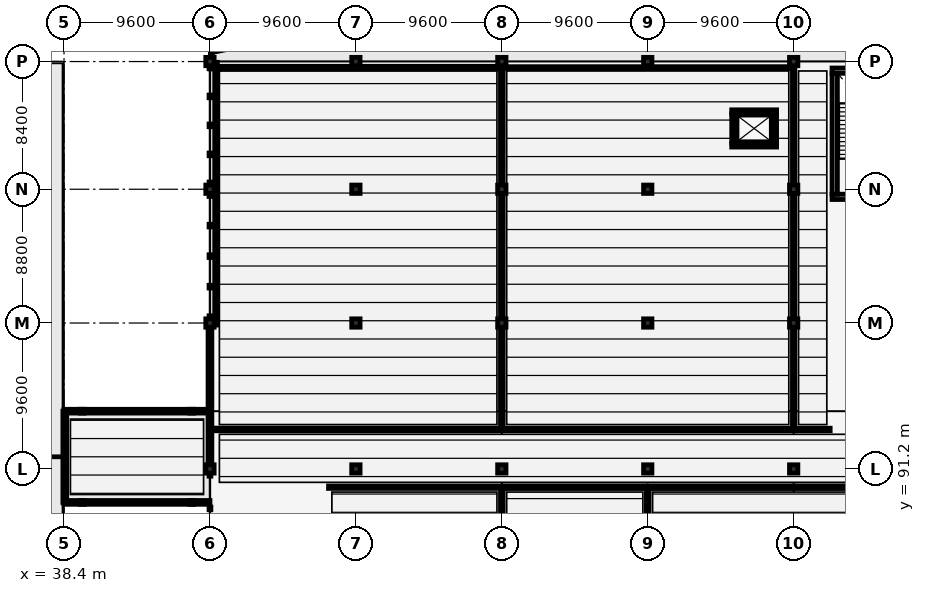
"""IFC4 building model, lengths in metres.
Left out: names, types, materials, properties, quantities, classifications, styles, units other than length and angle.
Written with IfcOpenShell. Run it as: python <this file> out.ifc"""

import sys

from ifc_helpers import new_model, si_unit, direction, frame, frame_2d, origin, origin_2d, place, context, subcontext, project, spatial, rectangle, hollow_rectangle, extrude, element, fill, save


model = new_model("IFC4")
c1 = context("Model", 3, precision=1e-05, world=origin(), true_north=direction((0.0, 1.0)))
c2 = subcontext(c1, "Body", "Model", "MODEL_VIEW")
j1 = project(units=[si_unit("LENGTHUNIT", "METRE"), si_unit("PLANEANGLEUNIT", "RADIAN")], contexts=[c1])
p1 = place(None, origin())
s1 = spatial("IfcSite", under=j1, at=p1, CompositionType="ELEMENT")
p2 = place(p1, origin())
s2 = spatial("IfcBuilding", under=s1, at=p2, CompositionType="ELEMENT")
p3 = place(p2, frame((0.0, 0.0, 4.8)))
s3 = spatial("IfcBuildingStorey", under=s2, at=p3, CompositionType="ELEMENT", Elevation=4.8)
for number, where, z_axis, x_axis in (
    (1, (48.0, 91.2, 0.0), (0.0, 0.0, 1.0), (1.0, 0.0, 0.0)),
    (2, (48.0, 100.8, 0.0), (0.0, 0.0, 1.0), (1.0, 0.0, 0.0)),
    (3, (48.0, 109.6, 0.0), (0.0, 0.0, 1.0), (1.0, 0.0, 0.0)),
    (4, (48.0, 118.0, 0.0), (0.0, 0.0, 1.0), (1.0, 0.0, 0.0)),
    (5, (57.6, 91.2, 0.0), (0.0, 0.0, 1.0), (1.0, 0.0, 0.0)),
    (6, (57.6, 100.8, 0.0), (0.0, 0.0, 1.0), (1.0, 0.0, 0.0)),
    (7, (57.6, 109.6, 0.0), (0.0, 0.0, 1.0), (1.0, 0.0, 0.0)),
    (8, (57.6, 118.0, 0.0), (0.0, 0.0, 1.0), (1.0, 0.0, 0.0)),
    (9, (67.2, 91.2, 0.0), (0.0, 0.0, 1.0), (1.0, 0.0, 0.0)),
    (10, (67.2, 100.8, 0.0), (0.0, 0.0, 1.0), (1.0, 0.0, 0.0)),
    (11, (67.2, 109.6, 0.0), (0.0, 0.0, 1.0), (1.0, 0.0, 0.0)),
    (12, (67.2, 118.0, 0.0), (0.0, 0.0, 1.0), (1.0, 0.0, 0.0)),
    (13, (76.8, 91.2, 0.0), (0.0, 0.0, 1.0), (1.0, 0.0, 0.0)),
    (14, (76.8, 100.8, 0.0), (0.0, 0.0, 1.0), (1.0, 0.0, 0.0)),
    (15, (76.8, 109.6, 0.0), (0.0, 0.0, 1.0), (1.0, 0.0, 0.0)),
    (16, (76.8, 118.0, 0.0), (0.0, 0.0, 1.0), (1.0, 0.0, 0.0)),
    (17, (86.4, 91.2, 0.0), (0.0, 0.0, 1.0), (1.0, 0.0, 0.0)),
    (18, (86.4, 100.8, 0.0), (0.0, 0.0, 1.0), (1.0, 0.0, 0.0)),
    (19, (86.4, 109.6, 0.0), (0.0, 0.0, 1.0), (1.0, 0.0, 0.0)),
    (20, (86.4, 118.0, 0.0), (0.0, 0.0, 1.0), (1.0, 0.0, 0.0)),
):
    element("IfcColumn", number, at=place(p3, frame(where, z_axis=z_axis, x_axis=x_axis)), inside=s3, PredefinedType="COLUMN", context=c2, shape_type="SweptSolid", body=[
        extrude(rectangle(XDim=0.55, YDim=0.55, at=origin_2d()), origin(), (0.0, 0.0, 1.0), 4.8),
    ])
for number, where, z_axis, x_axis in (
    (21, (39.6, 89.0, 0.0), (0.0, 0.0, 1.0), (1.0, 0.0, 0.0)),
    (22, (39.6, 95.0, 0.0), (0.0, 0.0, 1.0), (1.0, 0.0, 0.0)),
    (23, (46.8, 89.0, 0.0), (0.0, 0.0, 1.0), (1.0, 0.0, 0.0)),
    (24, (46.8, 95.0, 0.0), (0.0, 0.0, 1.0), (1.0, 0.0, 0.0)),
):
    element("IfcColumn", number, at=place(p3, frame(where, z_axis=z_axis, x_axis=x_axis)), inside=s3, PredefinedType="COLUMN", context=c2, shape_type="SweptSolid", body=[
        extrude(hollow_rectangle(XDim=0.254, YDim=0.254, WallThickness=0.012, at=origin_2d()), origin(), (0.0, 0.0, 1.0), 2.58),
    ])
p4 = place(p3, frame((48.0, 91.475, 0.0), z_axis=(0.0, 0.0, 1.0), x_axis=(0.0, 1.0, 0.0)))
e25 = element("IfcWall", 25, at=p4, inside=s3, PredefinedType="STANDARD", context=c2, shape_type="SweptSolid", body=[
    extrude(rectangle(XDim=9.05, YDim=0.25, at=frame_2d((4.525, 0.0))), origin(), (0.0, 0.0, 1.0), 4.046),
])
p5 = place(p4, frame((6.2, 0.0, 1.05)))
e26 = element("IfcOpeningElement", 26, at=p5, cuts=e25, PredefinedType="OPENING", context=c2, shape_type="SweptSolid", body=[
    extrude(rectangle(XDim=1.12, YDim=1.44, at=frame_2d((0.56, 0.72))), frame((0.0, 0.135, 0.0), z_axis=(0.0, -1.0, 0.0), x_axis=(1.0, 0.0, 0.0)), (0.0, 0.0, 1.0), 0.27),
])
p6 = place(p4, frame((0.35, 0.0, 0.0)))
e27 = element("IfcOpeningElement", 27, at=p6, cuts=e25, PredefinedType="OPENING", context=c2, shape_type="SweptSolid", body=[
    extrude(rectangle(XDim=1.25, YDim=2.15, at=frame_2d((0.625, 1.075))), frame((0.0, 0.135, 0.0), z_axis=(0.0, -1.0, 0.0), x_axis=(1.0, 0.0, 0.0)), (0.0, 0.0, 1.0), 0.27),
])
p7 = place(p3, frame((38.45, 89.0, 0.0), z_axis=(0.0, 0.0, 1.0), x_axis=(0.0, 1.0, 0.0)))
e28 = element("IfcWall", 28, at=p7, inside=s3, PredefinedType="STANDARD", context=c2, shape_type="SweptSolid", body=[
    extrude(rectangle(XDim=6.0, YDim=0.25, at=frame_2d((3.0, 0.0))), origin(), (0.0, 0.0, 1.0), 2.32),
])
p8 = place(p7, frame((0.7, 0.0, 0.0)))
e29 = element("IfcOpeningElement", 29, at=p8, cuts=e28, PredefinedType="OPENING", context=c2, shape_type="SweptSolid", body=[
    extrude(rectangle(XDim=1.48, YDim=2.11, at=frame_2d((0.74, 1.055))), frame((0.0, 0.135, 0.0), z_axis=(0.0, -1.0, 0.0), x_axis=(1.0, 0.0, 0.0)), (0.0, 0.0, 1.0), 0.27),
])
p9 = place(p7, frame((3.7, 0.0, 0.0)))
e30 = element("IfcOpeningElement", 30, at=p9, cuts=e28, PredefinedType="OPENING", context=c2, shape_type="SweptSolid", body=[
    extrude(rectangle(XDim=1.6, YDim=2.2, at=frame_2d((0.8, 1.1))), frame((0.0, 0.135, 0.0), z_axis=(0.0, -1.0, 0.0), x_axis=(1.0, 0.0, 0.0)), (0.0, 0.0, 1.0), 0.27),
])
for number, where, z_axis, x_axis in (
    (31, (38.4, 89.0, 0.0), (0.0, 0.0, 1.0), (1.0, 0.0, 0.0)),
    (32, (38.4, 95.0, 0.0), (0.0, 0.0, 1.0), (1.0, 0.0, 0.0)),
):
    element("IfcWall", number, at=place(p3, frame(where, z_axis=z_axis, x_axis=x_axis)), inside=s3, PredefinedType="STANDARD", context=c2, shape_type="SweptSolid", body=[
        extrude(rectangle(XDim=9.6, YDim=0.25, at=frame_2d((4.8, 0.0))), origin(), (0.0, 0.0, 1.0), 2.106),
    ])
for number, where, z_axis, x_axis in (
    (33, (94.575, 109.1, 0.0), (0.0, 0.0, 1.0), (-1.0, 0.0, 0.0)),
    (34, (88.925, 117.4, 0.0), (0.0, 0.0, 1.0), (1.0, 0.0, 0.0)),
):
    element("IfcWall", number, at=place(p3, frame(where, z_axis=z_axis, x_axis=x_axis)), inside=s3, PredefinedType="SHEAR", context=c2, shape_type="SweptSolid", body=[
        extrude(rectangle(XDim=5.65, YDim=0.35, at=frame_2d((2.825, 0.0))), origin(), (0.0, 0.0, 1.0), 4.55),
    ])
p10 = place(p3, frame((89.1, 109.275, 0.0), z_axis=(0.0, 0.0, 1.0), x_axis=(0.0, 1.0, 0.0)))
e35 = element("IfcWall", 35, at=p10, inside=s3, PredefinedType="SHEAR", context=c2, shape_type="SweptSolid", body=[
    extrude(rectangle(XDim=7.95, YDim=0.35, at=frame_2d((3.975, 0.0))), origin(), (0.0, 0.0, 1.0), 4.55),
])
p11 = place(p10, frame((0.22, 0.0, 0.0)))
e36 = element("IfcOpeningElement", 36, at=p11, cuts=e35, PredefinedType="OPENING", context=c2, shape_type="SweptSolid", body=[
    extrude(rectangle(XDim=2.05, YDim=2.15, at=frame_2d((1.025, 1.075))), frame((0.0, 0.185, 0.0), z_axis=(0.0, -1.0, 0.0), x_axis=(1.0, 0.0, 0.0)), (0.0, 0.0, 1.0), 0.37),
])
p12 = place(p3, frame((85.275, 112.5, 0.0), z_axis=(0.0, 0.0, 1.0), x_axis=(-1.0, 0.0, 0.0)))
e37 = element("IfcWall", 37, at=p12, inside=s3, PredefinedType="SOLIDWALL", context=c2, shape_type="SweptSolid", body=[
    extrude(rectangle(XDim=2.95, YDim=0.25, at=frame_2d((1.475, 0.0))), origin(), (0.0, 0.0, 1.0), 4.55),
])
p13 = place(p12, frame((0.925, 0.0, 0.0)))
e38 = element("IfcOpeningElement", 38, at=p13, cuts=e37, PredefinedType="OPENING", context=c2, shape_type="SweptSolid", body=[
    extrude(rectangle(XDim=1.1, YDim=2.15, at=frame_2d((0.55, 1.075))), frame((0.0, 0.135, 0.0), z_axis=(0.0, -1.0, 0.0), x_axis=(1.0, 0.0, 0.0)), (0.0, 0.0, 1.0), 0.27),
])
p14 = place(p3, frame((82.325, 114.7, 0.0), z_axis=(0.0, 0.0, 1.0), x_axis=(1.0, 0.0, 0.0)))
e39 = element("IfcWall", 39, at=p14, inside=s3, PredefinedType="SOLIDWALL", context=c2, shape_type="SweptSolid", body=[
    extrude(rectangle(XDim=2.95, YDim=0.25, at=frame_2d((1.475, 0.0))), origin(), (0.0, 0.0, 1.0), 4.55),
])
for number, where, z_axis, x_axis in (
    (40, (82.45, 112.625, 0.0), (0.0, 0.0, 1.0), (0.0, 1.0, 0.0)),
    (41, (85.15, 114.575, 0.0), (0.0, 0.0, 1.0), (0.0, -1.0, 0.0)),
):
    element("IfcWall", number, at=place(p3, frame(where, z_axis=z_axis, x_axis=x_axis)), inside=s3, PredefinedType="SOLIDWALL", context=c2, shape_type="SweptSolid", body=[
        extrude(rectangle(XDim=1.95, YDim=0.25, at=frame_2d((0.975, 0.0))), origin(), (0.0, 0.0, 1.0), 4.55),
    ])
p15 = place(p3, frame((67.2, 81.4, 0.0), z_axis=(0.0, 0.0, 1.0), x_axis=(0.0, 1.0, 0.0)))
e42 = element("IfcWall", 42, at=p15, inside=s3, PredefinedType="PARTITIONING", context=c2, shape_type="SweptSolid", body=[
    extrude(rectangle(XDim=8.5, YDim=0.175, at=frame_2d((4.25, 0.0))), origin(), (0.0, 0.0, 1.0), 4.037),
])
p16 = place(p15, frame((3.45, 0.0, 0.0)))
e43 = element("IfcOpeningElement", 43, at=p16, cuts=e42, PredefinedType="OPENING", context=c2, shape_type="SweptSolid", body=[
    extrude(rectangle(XDim=1.6, YDim=2.15, at=frame_2d((0.8, 1.075))), frame((0.0, 0.097, 0.0), z_axis=(0.0, -1.0, 0.0), x_axis=(1.0, 0.0, 0.0)), (0.0, 0.0, 1.0), 0.195),
])
p17 = place(p3, frame((55.8, 90.0, 0.0), z_axis=(0.0, 0.0, 1.0), x_axis=(1.0, 0.0, 0.0)))
e44 = element("IfcWall", 44, at=p17, inside=s3, PredefinedType="PARTITIONING", context=c2, shape_type="SweptSolid", body=[
    extrude(rectangle(XDim=11.3, YDim=0.16, at=frame_2d((5.65, 0.0))), origin(), (0.0, 0.0, 1.0), 4.42),
])
p18 = place(p17, frame((4.75, 0.0, 0.0)))
e45 = element("IfcOpeningElement", 45, at=p18, cuts=e44, PredefinedType="OPENING", context=c2, shape_type="SweptSolid", body=[
    extrude(rectangle(XDim=1.8, YDim=2.15, at=frame_2d((0.9, 1.075))), frame((0.0, 0.09, 0.0), z_axis=(0.0, -1.0, 0.0), x_axis=(1.0, 0.0, 0.0)), (0.0, 0.0, 1.0), 0.18),
])
p19 = place(p3, frame((76.8, 81.4, 0.0), z_axis=(0.0, 0.0, 1.0), x_axis=(0.0, 1.0, 0.0)))
e46 = element("IfcWall", 46, at=p19, inside=s3, PredefinedType="PARTITIONING", context=c2, shape_type="SweptSolid", body=[
    extrude(rectangle(XDim=8.5, YDim=0.175, at=frame_2d((4.25, 0.0))), origin(), (0.0, 0.0, 1.0), 4.037),
])
p20 = place(p3, frame((67.3, 90.0, 0.0), z_axis=(0.0, 0.0, 1.0), x_axis=(1.0, 0.0, 0.0)))
e47 = element("IfcWall", 47, at=p20, inside=s3, PredefinedType="PARTITIONING", context=c2, shape_type="SweptSolid", body=[
    extrude(rectangle(XDim=9.4, YDim=0.175, at=frame_2d((4.7, 0.0))), origin(), (0.0, 0.0, 1.0), 4.42),
])
p21 = place(p20, frame((3.9, 0.0, 0.0)))
e48 = element("IfcOpeningElement", 48, at=p21, cuts=e47, PredefinedType="OPENING", context=c2, shape_type="SweptSolid", body=[
    extrude(rectangle(XDim=1.6, YDim=2.15, at=frame_2d((0.8, 1.075))), frame((0.0, 0.097, 0.0), z_axis=(0.0, -1.0, 0.0), x_axis=(1.0, 0.0, 0.0)), (0.0, 0.0, 1.0), 0.195),
])
p22 = place(p3, frame((76.9, 90.0, 0.0), z_axis=(0.0, 0.0, 1.0), x_axis=(1.0, 0.0, 0.0)))
e49 = element("IfcWall", 49, at=p22, inside=s3, PredefinedType="PARTITIONING", context=c2, shape_type="SweptSolid", body=[
    extrude(rectangle(XDim=19.05, YDim=0.175, at=frame_2d((9.525, 0.0))), origin(), (0.0, 0.0, 1.0), 4.42),
])
p23 = place(p22, frame((6.216, 0.0, 0.0)))
e50 = element("IfcOpeningElement", 50, at=p23, cuts=e49, PredefinedType="OPENING", context=c2, shape_type="SweptSolid", body=[
    extrude(rectangle(XDim=1.6, YDim=2.15, at=frame_2d((0.8, 1.075))), frame((0.0, 0.097, 0.0), z_axis=(0.0, -1.0, 0.0), x_axis=(1.0, 0.0, 0.0)), (0.0, 0.0, 1.0), 0.195),
])
p24 = place(p3, frame((86.5, 93.8, 0.0), z_axis=(0.0, 0.0, 1.0), x_axis=(1.0, 0.0, 0.0)))
e51 = element("IfcWall", 51, at=p24, inside=s3, PredefinedType="PARTITIONING", context=c2, shape_type="SweptSolid", body=[
    extrude(rectangle(XDim=2.3, YDim=0.16, at=frame_2d((1.15, 0.0))), origin(), (0.0, 0.0, 1.0), 4.42),
])
p25 = place(p24, frame((0.25, 0.0, 0.0)))
e52 = element("IfcOpeningElement", 52, at=p25, cuts=e51, PredefinedType="OPENING", context=c2, shape_type="SweptSolid", body=[
    extrude(rectangle(XDim=1.8, YDim=2.15, at=frame_2d((0.9, 1.075))), frame((0.0, 0.09, 0.0), z_axis=(0.0, -1.0, 0.0), x_axis=(1.0, 0.0, 0.0)), (0.0, 0.0, 1.0), 0.18),
])
p26 = place(p3, frame((48.05, 93.8, 0.0), z_axis=(0.0, 0.0, 1.0), x_axis=(1.0, 0.0, 0.0)))
e53 = element("IfcWall", 53, at=p26, inside=s3, PredefinedType="PARTITIONING", context=c2, shape_type="SweptSolid", body=[
    extrude(rectangle(XDim=19.05, YDim=0.175, at=frame_2d((9.525, 0.0))), origin(), (0.0, 0.0, 1.0), 4.42),
])
p27 = place(p26, frame((8.725, 0.0, 0.0)))
e54 = element("IfcOpeningElement", 54, at=p27, cuts=e53, PredefinedType="OPENING", context=c2, shape_type="SweptSolid", body=[
    extrude(rectangle(XDim=1.6, YDim=2.15, at=frame_2d((0.8, 1.075))), frame((0.0, 0.097, 0.0), z_axis=(0.0, -1.0, 0.0), x_axis=(1.0, 0.0, 0.0)), (0.0, 0.0, 1.0), 0.195),
])
p28 = place(p3, frame((67.3, 93.8, 0.0), z_axis=(0.0, 0.0, 1.0), x_axis=(1.0, 0.0, 0.0)))
e55 = element("IfcWall", 55, at=p28, inside=s3, PredefinedType="PARTITIONING", context=c2, shape_type="SweptSolid", body=[
    extrude(rectangle(XDim=19.0, YDim=0.16, at=frame_2d((9.5, 0.0))), origin(), (0.0, 0.0, 1.0), 4.42),
])
p29 = place(p28, frame((8.925, 0.0, 0.0)))
e56 = element("IfcOpeningElement", 56, at=p29, cuts=e55, PredefinedType="OPENING", context=c2, shape_type="SweptSolid", body=[
    extrude(rectangle(XDim=1.15, YDim=2.2, at=frame_2d((0.575, 1.1))), frame((0.0, 0.09, 0.0), z_axis=(0.0, -1.0, 0.0), x_axis=(1.0, 0.0, 0.0)), (0.0, 0.0, 1.0), 0.18),
])
p30 = place(p3, frame((86.4, 93.9, 0.0), z_axis=(0.0, 0.0, 1.0), x_axis=(0.0, 1.0, 0.0)))
e57 = element("IfcWall", 57, at=p30, inside=s3, PredefinedType="PARTITIONING", context=c2, shape_type="SweptSolid", body=[
    extrude(rectangle(XDim=24.05, YDim=0.16, at=frame_2d((12.025, 0.0))), origin(), (0.0, 0.0, 1.0), 4.037),
])
p31 = place(p30, frame((11.45, 0.0, 0.0)))
e58 = element("IfcOpeningElement", 58, at=p31, cuts=e57, PredefinedType="OPENING", context=c2, shape_type="SweptSolid", body=[
    extrude(rectangle(XDim=1.15, YDim=2.2, at=frame_2d((0.575, 1.1))), frame((0.0, 0.09, 0.0), z_axis=(0.0, -1.0, 0.0), x_axis=(1.0, 0.0, 0.0)), (0.0, 0.0, 1.0), 0.18),
])
p32 = place(p3, frame((67.2, 93.9, 0.0), z_axis=(0.0, 0.0, 1.0), x_axis=(0.0, 1.0, 0.0)))
e59 = element("IfcWall", 59, at=p32, inside=s3, PredefinedType="PARTITIONING", context=c2, shape_type="SweptSolid", body=[
    extrude(rectangle(XDim=24.05, YDim=0.175, at=frame_2d((12.025, 0.0))), origin(), (0.0, 0.0, 1.0), 4.037),
])
p33 = place(p3, frame((48.05, 117.6, 0.0), z_axis=(0.0, 0.0, 1.0), x_axis=(1.0, 0.0, 0.0)))
e60 = element("IfcWall", 60, at=p33, inside=s3, PredefinedType="PARTITIONING", context=c2, shape_type="SweptSolid", body=[
    extrude(rectangle(XDim=18.91, YDim=0.175, at=frame_2d((9.455, 0.0))), origin(), (0.0, 0.0, 1.0), 4.42),
])
p34 = place(p3, frame((48.4, 100.665, 0.0), z_axis=(0.0, 0.0, 1.0), x_axis=(0.0, 1.0, 0.0)))
e61 = element("IfcWall", 61, at=p34, inside=s3, PredefinedType="PARTITIONING", context=c2, shape_type="SweptSolid", body=[
    extrude(rectangle(XDim=17.285, YDim=0.175, at=frame_2d((8.643, 0.0))), origin(), (0.0, 0.0, 1.0), 4.42),
])
p35 = place(p3, frame((67.44, 117.6, 0.0), z_axis=(0.0, 0.0, 1.0), x_axis=(1.0, 0.0, 0.0)))
e62 = element("IfcWall", 62, at=p35, inside=s3, PredefinedType="PARTITIONING", context=c2, shape_type="SweptSolid", body=[
    extrude(rectangle(XDim=18.72, YDim=0.125, at=frame_2d((9.36, 0.0))), origin(), (0.0, 0.0, 1.0), 4.42),
])
p36 = place(p5, origin())
e63 = element("IfcWindow", 63, at=p36, inside=s3, PartitioningType="SINGLE_PANEL", PredefinedType="WINDOW", context=c2, shape_type="SweptSolid", body=[
    extrude(rectangle(XDim=1.12, YDim=1.44, at=frame_2d((0.56, 0.72))), frame((0.0, 0.03, 0.0), z_axis=(0.0, -1.0, 0.0), x_axis=(1.0, 0.0, 0.0)), (0.0, 0.0, 1.0), 0.06),
])
fill(e26, e63)
p37 = place(p8, origin())
e64 = element("IfcDoor", 64, at=p37, inside=s3, OperationType="DOUBLE_DOOR_SINGLE_SWING", PredefinedType="DOOR", context=c2, shape_type="SweptSolid", body=[
    extrude(rectangle(XDim=1.48, YDim=2.11, at=frame_2d((0.74, 1.055))), frame((0.0, 0.025, 0.0), z_axis=(0.0, -1.0, 0.0), x_axis=(1.0, 0.0, 0.0)), (0.0, 0.0, 1.0), 0.05),
])
fill(e29, e64)
p38 = place(p9, origin())
e65 = element("IfcDoor", 65, at=p38, inside=s3, OperationType="DOUBLE_DOOR_SINGLE_SWING", PredefinedType="DOOR", context=c2, shape_type="SweptSolid", body=[
    extrude(rectangle(XDim=1.6, YDim=2.2, at=frame_2d((0.8, 1.1))), frame((0.0, 0.025, 0.0), z_axis=(0.0, -1.0, 0.0), x_axis=(1.0, 0.0, 0.0)), (0.0, 0.0, 1.0), 0.05),
])
fill(e30, e65)
p39 = place(p3, frame((0.0, 0.0, 2.58)))
p40 = place(p39, frame((43.2, 92.0, 0.17)))
e66 = element("IfcDoor", 66, at=p40, inside=s3, OperationType="SINGLE_SWING_LEFT", PredefinedType="TRAPDOOR", context=c2, shape_type="SweptSolid", body=[
    extrude(rectangle(XDim=1.0, YDim=1.2, at=origin_2d()), origin(), (0.0, 0.0, 1.0), 0.05),
])
p41 = place(p11, origin())
e67 = element("IfcDoor", 67, at=p41, inside=s3, OperationType="DOUBLE_DOOR_SINGLE_SWING", PredefinedType="DOOR", context=c2, shape_type="SweptSolid", body=[
    extrude(rectangle(XDim=2.05, YDim=2.15, at=frame_2d((1.025, 1.075))), frame((0.0, 0.025, 0.0), z_axis=(0.0, -1.0, 0.0), x_axis=(1.0, 0.0, 0.0)), (0.0, 0.0, 1.0), 0.05),
])
fill(e36, e67)
p42 = place(p13, origin())
e68 = element("IfcDoor", 68, at=p42, inside=s3, OperationType="DOUBLE_DOOR_SLIDING", PredefinedType="DOOR", context=c2, shape_type="SweptSolid", body=[
    extrude(rectangle(XDim=1.1, YDim=2.15, at=frame_2d((0.55, 1.075))), frame((0.0, 0.025, 0.0), z_axis=(0.0, -1.0, 0.0), x_axis=(1.0, 0.0, 0.0)), (0.0, 0.0, 1.0), 0.05),
])
fill(e38, e68)
p43 = place(p18, origin())
e69 = element("IfcDoor", 69, at=p43, inside=s3, OperationType="DOUBLE_DOOR_SINGLE_SWING", PredefinedType="DOOR", context=c2, shape_type="SweptSolid", body=[
    extrude(rectangle(XDim=1.8, YDim=2.15, at=frame_2d((0.9, 1.075))), frame((0.0, 0.025, 0.0), z_axis=(0.0, -1.0, 0.0), x_axis=(1.0, 0.0, 0.0)), (0.0, 0.0, 1.0), 0.05),
])
fill(e45, e69)
p44 = place(p21, origin())
e70 = element("IfcDoor", 70, at=p44, inside=s3, OperationType="DOUBLE_DOOR_SINGLE_SWING", PredefinedType="DOOR", context=c2, shape_type="SweptSolid", body=[
    extrude(rectangle(XDim=1.6, YDim=2.15, at=frame_2d((0.8, 1.075))), frame((0.0, 0.025, 0.0), z_axis=(0.0, -1.0, 0.0), x_axis=(1.0, 0.0, 0.0)), (0.0, 0.0, 1.0), 0.05),
])
fill(e48, e70)
p45 = place(p23, origin())
e71 = element("IfcDoor", 71, at=p45, inside=s3, OperationType="DOUBLE_DOOR_SINGLE_SWING", PredefinedType="DOOR", context=c2, shape_type="SweptSolid", body=[
    extrude(rectangle(XDim=1.6, YDim=2.15, at=frame_2d((0.8, 1.075))), frame((0.0, 0.025, 0.0), z_axis=(0.0, -1.0, 0.0), x_axis=(1.0, 0.0, 0.0)), (0.0, 0.0, 1.0), 0.05),
])
fill(e50, e71)
p46 = place(p25, origin())
e72 = element("IfcDoor", 72, at=p46, inside=s3, OperationType="DOUBLE_DOOR_SINGLE_SWING", PredefinedType="DOOR", context=c2, shape_type="SweptSolid", body=[
    extrude(rectangle(XDim=1.8, YDim=2.15, at=frame_2d((0.9, 1.075))), frame((0.0, 0.025, 0.0), z_axis=(0.0, -1.0, 0.0), x_axis=(1.0, 0.0, 0.0)), (0.0, 0.0, 1.0), 0.05),
])
fill(e52, e72)
p47 = place(p27, origin())
e73 = element("IfcDoor", 73, at=p47, inside=s3, OperationType="DOUBLE_DOOR_SINGLE_SWING", PredefinedType="DOOR", context=c2, shape_type="SweptSolid", body=[
    extrude(rectangle(XDim=1.6, YDim=2.15, at=frame_2d((0.8, 1.075))), frame((0.0, 0.025, 0.0), z_axis=(0.0, -1.0, 0.0), x_axis=(1.0, 0.0, 0.0)), (0.0, 0.0, 1.0), 0.05),
])
fill(e54, e73)
p48 = place(p29, origin())
e74 = element("IfcDoor", 74, at=p48, inside=s3, OperationType="SINGLE_SWING_LEFT", PredefinedType="DOOR", context=c2, shape_type="SweptSolid", body=[
    extrude(rectangle(XDim=1.15, YDim=2.2, at=frame_2d((0.575, 1.1))), frame((0.0, 0.025, 0.0), z_axis=(0.0, -1.0, 0.0), x_axis=(1.0, 0.0, 0.0)), (0.0, 0.0, 1.0), 0.05),
])
fill(e56, e74)
p49 = place(p31, origin())
e75 = element("IfcDoor", 75, at=p49, inside=s3, OperationType="SINGLE_SWING_LEFT", PredefinedType="DOOR", context=c2, shape_type="SweptSolid", body=[
    extrude(rectangle(XDim=1.15, YDim=2.2, at=frame_2d((0.575, 1.1))), frame((0.0, 0.025, 0.0), z_axis=(0.0, -1.0, 0.0), x_axis=(1.0, 0.0, 0.0)), (0.0, 0.0, 1.0), 0.05),
])
fill(e58, e75)
p50 = place(p6, origin())
e76 = element("IfcDoor", 76, at=p50, inside=s3, OperationType="SINGLE_SWING_RIGHT", PredefinedType="DOOR", context=c2, shape_type="SweptSolid", body=[
    extrude(rectangle(XDim=1.25, YDim=2.15, at=frame_2d((0.625, 1.075))), frame((0.0, 0.025, 0.0), z_axis=(0.0, -1.0, 0.0), x_axis=(1.0, 0.0, 0.0)), (0.0, 0.0, 1.0), 0.05),
])
fill(e27, e76)
save(model, sys.argv[1])
